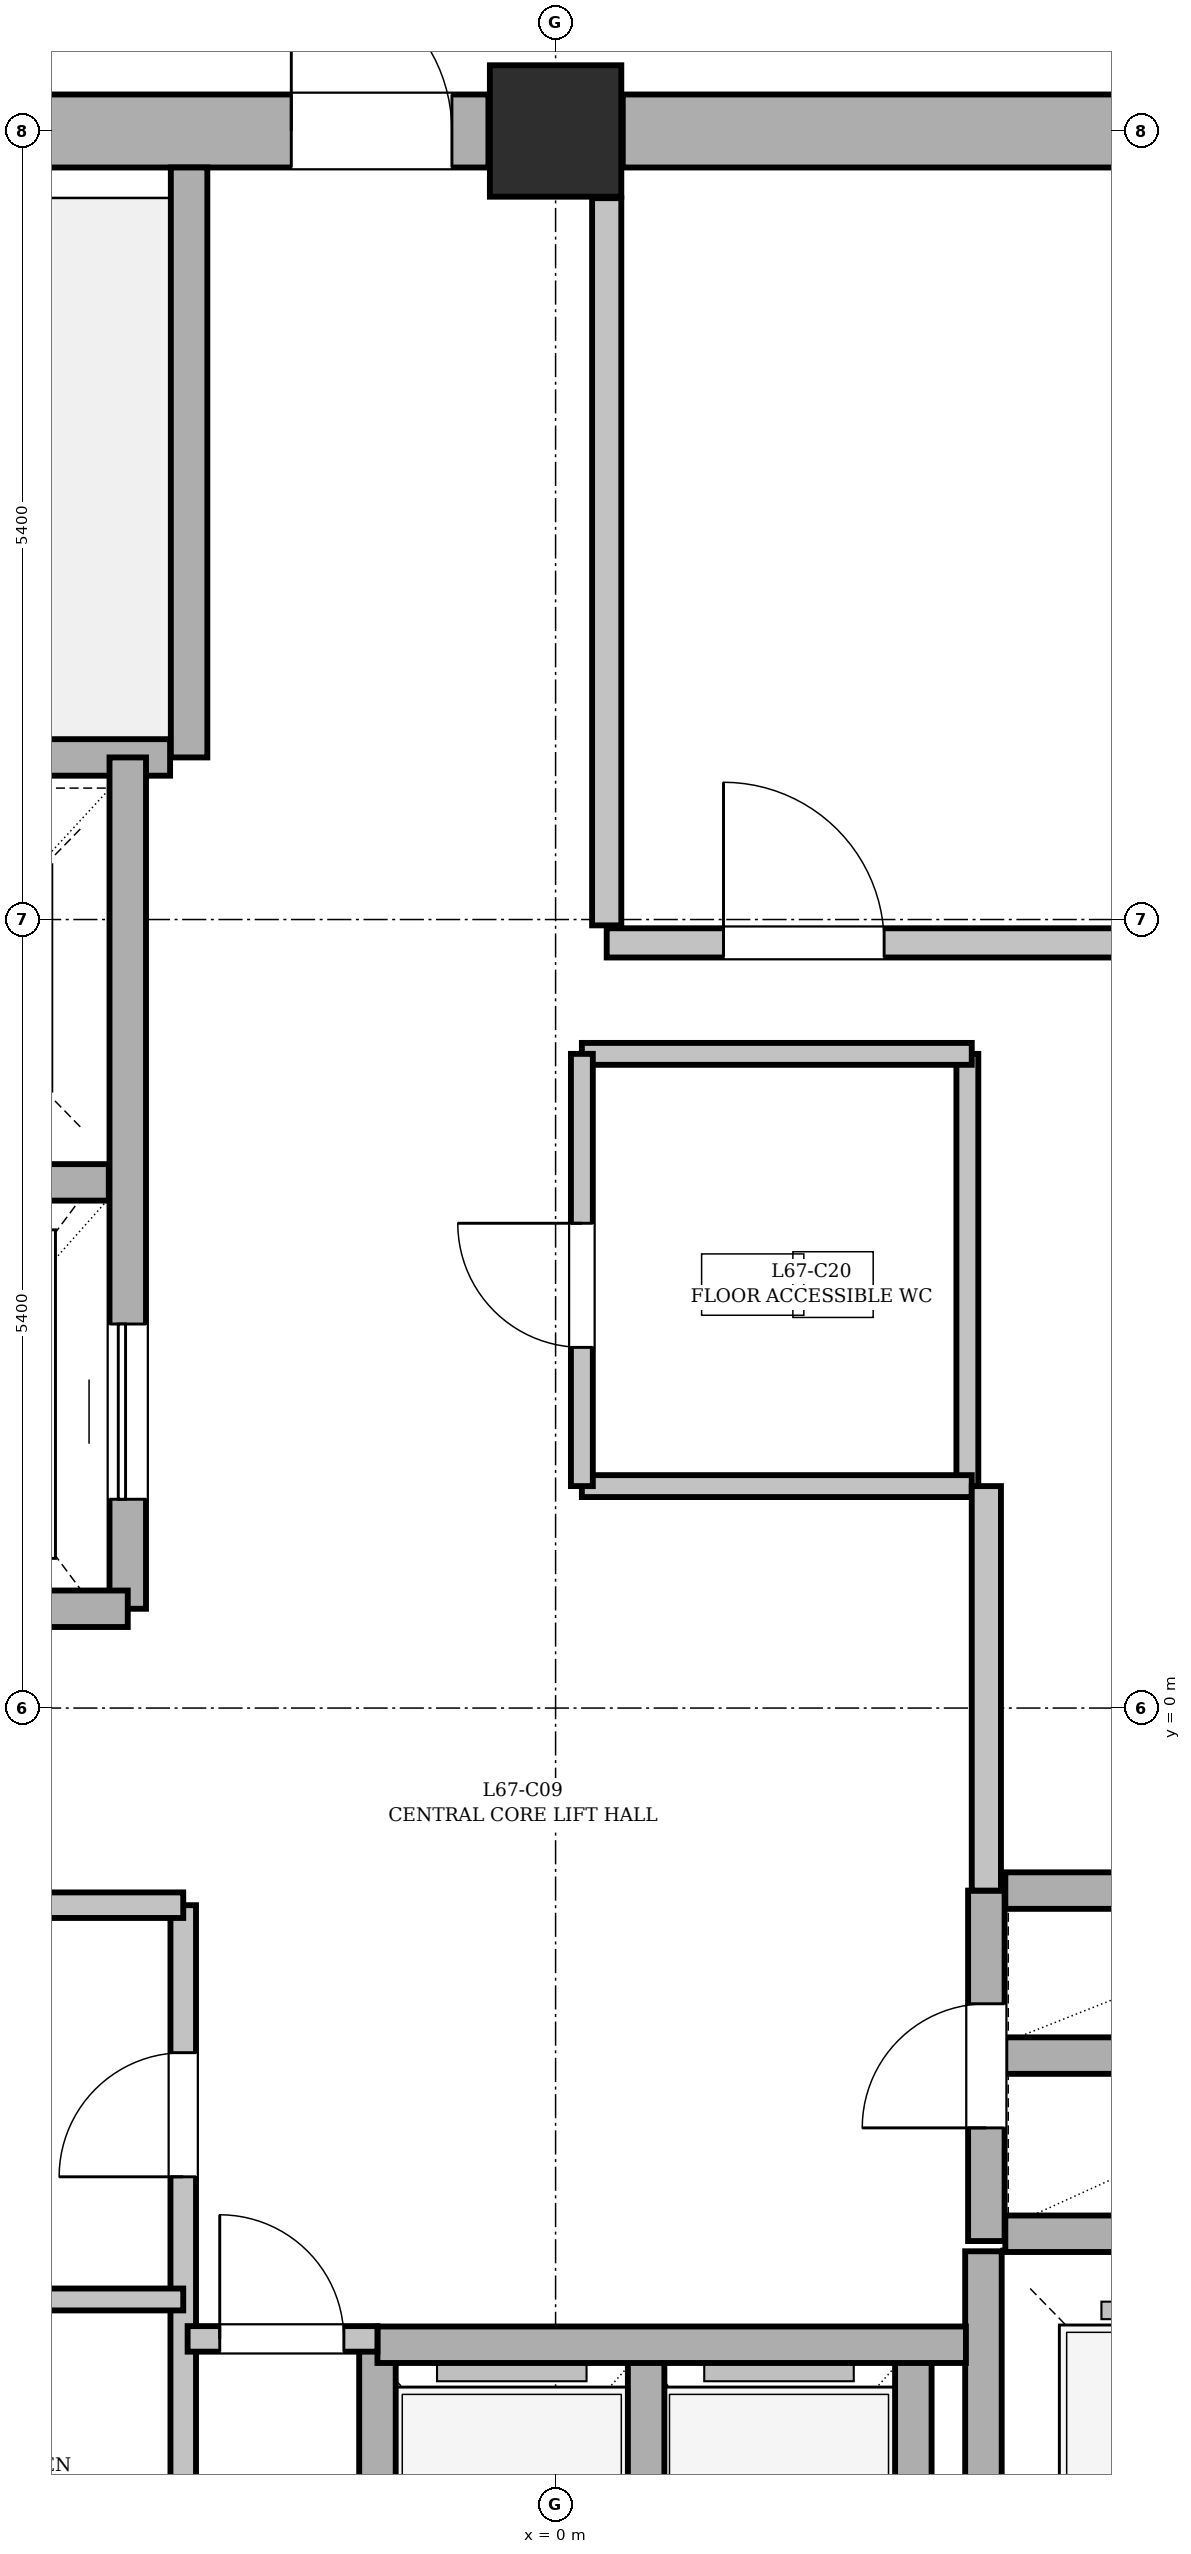
"""IFC4 building model, lengths in metres.
Left out: names, types, materials, properties, quantities, classifications, styles, units other than length and angle.
Written with IfcOpenShell. Run it as: python <this file> out.ifc"""

import sys

from ifc_helpers import new_model, si_unit, direction, frame, frame_2d, origin, origin_2d, place, context, subcontext, project, spatial, rectangle, extrude, element, fill, save


model = new_model("IFC4")
c1 = context("Model", 3, precision=1e-05, world=origin(), true_north=direction((0.0, 1.0)))
c2 = subcontext(c1, "Body", "Model", "MODEL_VIEW")
j1 = project(units=[si_unit("LENGTHUNIT", "METRE"), si_unit("PLANEANGLEUNIT", "RADIAN")], contexts=[c1])
p1 = place(None, origin())
s1 = spatial("IfcSite", under=j1, at=p1, CompositionType="ELEMENT")
p2 = place(p1, origin())
s2 = spatial("IfcBuilding", under=s1, at=p2, CompositionType="ELEMENT")
p3 = place(p2, frame((0.0, 0.0, 258.75)))
s3 = spatial("IfcBuildingStorey", under=s2, at=p3, CompositionType="ELEMENT", Elevation=258.75)
p4 = place(p3, frame((0.0, 10.8, 0.0), z_axis=(0.0, 0.0, 1.0), x_axis=(1.0, 0.0, 0.0)))
e1 = element("IfcColumn", 1, at=p4, inside=s3, PredefinedType="COLUMN", context=c2, shape_type="SweptSolid", body=[
    extrude(rectangle(XDim=0.9, YDim=0.9, at=origin_2d()), origin(), (0.0, 0.0, 1.0), 3.75),
])
p5 = place(p3, frame((-4.94, 10.8, 0.0), z_axis=(0.0, 0.0, 1.0), x_axis=(1.0, 0.0, 0.0)))
e2 = element("IfcWall", 2, at=p5, inside=s3, PredefinedType="SHEAR", context=c2, shape_type="SweptSolid", body=[
    extrude(rectangle(XDim=4.48, YDim=0.5, at=frame_2d((2.24, 0.0))), origin(), (0.0, 0.0, 1.0), 3.75),
])
p6 = place(p5, frame((3.13, 0.0, 0.0)))
e3 = element("IfcOpeningElement", 3, at=p6, cuts=e2, PredefinedType="OPENING", context=c2, shape_type="SweptSolid", body=[
    extrude(rectangle(XDim=1.1, YDim=2.1, at=frame_2d((0.55, 1.05))), frame((0.0, 0.26, 0.0), z_axis=(0.0, -1.0, 0.0), x_axis=(1.0, 0.0, 0.0)), (0.0, 0.0, 1.0), 0.52),
])
p7 = place(p3, frame((0.46, 10.8, 0.0), z_axis=(0.0, 0.0, 1.0), x_axis=(1.0, 0.0, 0.0)))
e4 = element("IfcWall", 4, at=p7, inside=s3, PredefinedType="SHEAR", context=c2, shape_type="SweptSolid", body=[
    extrude(rectangle(XDim=4.48, YDim=0.5, at=frame_2d((2.24, 0.0))), origin(), (0.0, 0.0, 1.0), 3.75),
])
p8 = place(p3, frame((2.93, -6.51, 0.0), z_axis=(0.0, 0.0, 1.0), x_axis=(0.0, 1.0, 0.0)))
e5 = element("IfcWall", 5, at=p8, inside=s3, PredefinedType="SHEAR", context=c2, shape_type="SweptSolid", body=[
    extrude(rectangle(XDim=2.79, YDim=0.25, at=frame_2d((1.395, 0.0))), origin(), (0.0, 0.0, 1.0), 3.75),
])
p9 = place(p3, frame((3.08, -3.6, 0.0), z_axis=(0.0, 0.0, 1.0), x_axis=(1.0, 0.0, 0.0)))
e6 = element("IfcWall", 6, at=p9, inside=s3, PredefinedType="SHEAR", context=c2, shape_type="SweptSolid", body=[
    extrude(rectangle(XDim=2.37, YDim=0.25, at=frame_2d((1.185, 0.0))), origin(), (0.0, 0.0, 1.0), 3.75),
])
for number, where, z_axis, x_axis in (
    (7, (0.62, -6.34, 0.0), (0.0, 0.0, 1.0), (0.0, 1.0, 0.0)),
    (8, (2.45, -6.34, 0.0), (0.0, 0.0, 1.0), (0.0, 1.0, 0.0)),
):
    element("IfcWall", number, at=place(p3, frame(where, z_axis=z_axis, x_axis=x_axis)), inside=s3, PredefinedType="SHEAR", context=c2, shape_type="SweptSolid", body=[
        extrude(rectangle(XDim=1.88, YDim=0.25, at=frame_2d((0.94, 0.0))), origin(), (0.0, 0.0, 1.0), 3.75),
    ])
p10 = place(p3, frame((-1.22, -6.44, 0.0), z_axis=(0.0, 0.0, 1.0), x_axis=(0.0, 1.0, 0.0)))
e9 = element("IfcWall", 9, at=p10, inside=s3, PredefinedType="SHEAR", context=c2, shape_type="SweptSolid", body=[
    extrude(rectangle(XDim=2.08, YDim=0.25, at=frame_2d((1.04, 0.0))), origin(), (0.0, 0.0, 1.0), 3.75),
])
p11 = place(p3, frame((-1.22, -4.36, 0.0), z_axis=(0.0, 0.0, 1.0), x_axis=(1.0, 0.0, 0.0)))
e10 = element("IfcWall", 10, at=p11, inside=s3, PredefinedType="SHEAR", context=c2, shape_type="SweptSolid", body=[
    extrude(rectangle(XDim=4.03, YDim=0.25, at=frame_2d((2.015, 0.0))), origin(), (0.0, 0.0, 1.0), 3.75),
])
for number, where, z_axis, x_axis in (
    (11, (3.08, -2.38, 0.0), (0.0, 0.0, 1.0), (1.0, 0.0, 0.0)),
    (12, (3.08, -1.25, 0.0), (0.0, 0.0, 1.0), (1.0, 0.0, 0.0)),
):
    element("IfcWall", number, at=place(p3, frame(where, z_axis=z_axis, x_axis=x_axis)), inside=s3, PredefinedType="SHEAR", context=c2, shape_type="SweptSolid", body=[
        extrude(rectangle(XDim=2.37, YDim=0.25, at=frame_2d((1.185, 0.0))), origin(), (0.0, 0.0, 1.0), 3.75),
    ])
p12 = place(p3, frame((2.95, -3.65, 0.0), z_axis=(0.0, 0.0, 1.0), x_axis=(0.0, 1.0, 0.0)))
e13 = element("IfcWall", 13, at=p12, inside=s3, PredefinedType="SHEAR", context=c2, shape_type="SweptSolid", body=[
    extrude(rectangle(XDim=2.4, YDim=0.25, at=frame_2d((1.2, 0.0))), origin(), (0.0, 0.0, 1.0), 3.75),
])
p13 = place(p12, frame((0.775, 0.0, 0.0)))
e14 = element("IfcOpeningElement", 14, at=p13, cuts=e13, PredefinedType="OPENING", context=c2, shape_type="SweptSolid", body=[
    extrude(rectangle(XDim=0.85, YDim=2.1, at=frame_2d((0.425, 1.05))), frame((0.0, 0.135, 0.0), z_axis=(0.0, -1.0, 0.0), x_axis=(1.0, 0.0, 0.0)), (0.0, 0.0, 1.0), 0.27),
])
p14 = place(p3, frame((-2.51, 6.51, 0.0), z_axis=(0.0, 0.0, 1.0), x_axis=(0.0, 1.0, 0.0)))
e15 = element("IfcWall", 15, at=p14, inside=s3, PredefinedType="SHEAR", context=c2, shape_type="SweptSolid", body=[
    extrude(rectangle(XDim=4.04, YDim=0.25, at=frame_2d((2.02, 0.0))), origin(), (0.0, 0.0, 1.0), 3.75),
])
p15 = place(p3, frame((-10.34, 6.51, 0.0), z_axis=(0.0, 0.0, 1.0), x_axis=(1.0, 0.0, 0.0)))
e16 = element("IfcWall", 16, at=p15, inside=s3, PredefinedType="SHEAR", context=c2, shape_type="SweptSolid", body=[
    extrude(rectangle(XDim=7.7, YDim=0.25, at=frame_2d((3.85, 0.0))), origin(), (0.0, 0.0, 1.0), 3.75),
])
p16 = place(p15, frame((0.35, 0.0, 0.0)))
e17 = element("IfcOpeningElement", 17, at=p16, cuts=e16, PredefinedType="OPENING", context=c2, shape_type="SweptSolid", body=[
    extrude(rectangle(XDim=1.1, YDim=2.1, at=frame_2d((0.55, 1.05))), frame((0.0, 0.135, 0.0), z_axis=(0.0, -1.0, 0.0), x_axis=(1.0, 0.0, 0.0)), (0.0, 0.0, 1.0), 0.27),
])
p17 = place(p3, frame((-2.93, 0.68, 0.0), z_axis=(0.0, 0.0, 1.0), x_axis=(0.0, 1.0, 0.0)))
e18 = element("IfcWall", 18, at=p17, inside=s3, PredefinedType="SHEAR", context=c2, shape_type="SweptSolid", body=[
    extrude(rectangle(XDim=5.83, YDim=0.25, at=frame_2d((2.915, 0.0))), origin(), (0.0, 0.0, 1.0), 3.75),
])
p18 = place(p17, frame((0.75, 0.0, 0.0)))
e19 = element("IfcOpeningElement", 19, at=p18, cuts=e18, PredefinedType="OPENING", context=c2, shape_type="SweptSolid", body=[
    extrude(rectangle(XDim=1.2, YDim=2.1, at=frame_2d((0.6, 1.05))), frame((0.0, 0.135, 0.0), z_axis=(0.0, -1.0, 0.0), x_axis=(1.0, 0.0, 0.0)), (0.0, 0.0, 1.0), 0.27),
])
p19 = place(p3, frame((-5.45, 3.6, 0.0), z_axis=(0.0, 0.0, 1.0), x_axis=(1.0, 0.0, 0.0)))
e20 = element("IfcWall", 20, at=p19, inside=s3, PredefinedType="SHEAR", context=c2, shape_type="SweptSolid", body=[
    extrude(rectangle(XDim=2.39, YDim=0.25, at=frame_2d((1.195, 0.0))), origin(), (0.0, 0.0, 1.0), 3.75),
])
p20 = place(p3, frame((-5.58, 0.68, 0.0), z_axis=(0.0, 0.0, 1.0), x_axis=(1.0, 0.0, 0.0)))
e21 = element("IfcWall", 21, at=p20, inside=s3, PredefinedType="SHEAR", context=c2, shape_type="SweptSolid", body=[
    extrude(rectangle(XDim=2.65, YDim=0.25, at=frame_2d((1.325, 0.0))), origin(), (0.0, 0.0, 1.0), 3.75),
])
p21 = place(p3, frame((2.82, 1.52, 0.0), z_axis=(0.0, 0.0, 1.0), x_axis=(0.0, 1.0, 0.0)))
e22 = element("IfcWall", 22, at=p21, inside=s3, PredefinedType="PARTITIONING", context=c2, shape_type="SweptSolid", body=[
    extrude(rectangle(XDim=2.96, YDim=0.15, at=frame_2d((1.48, 0.0))), origin(), (0.0, 0.0, 1.0), 3.57),
])
for number, where, z_axis, x_axis in (
    (23, (0.18, 4.48, 0.0), (0.0, 0.0, 1.0), (1.0, 0.0, 0.0)),
    (24, (0.18, 1.52, 0.0), (0.0, 0.0, 1.0), (1.0, 0.0, 0.0)),
):
    element("IfcWall", number, at=place(p3, frame(where, z_axis=z_axis, x_axis=x_axis)), inside=s3, PredefinedType="PARTITIONING", context=c2, shape_type="SweptSolid", body=[
        extrude(rectangle(XDim=2.67, YDim=0.15, at=frame_2d((1.335, 0.0))), origin(), (0.0, 0.0, 1.0), 3.57),
    ])
p22 = place(p3, frame((0.18, 1.52, 0.0), z_axis=(0.0, 0.0, 1.0), x_axis=(0.0, 1.0, 0.0)))
e25 = element("IfcWall", 25, at=p22, inside=s3, PredefinedType="PARTITIONING", context=c2, shape_type="SweptSolid", body=[
    extrude(rectangle(XDim=2.96, YDim=0.15, at=frame_2d((1.48, 0.0))), origin(), (0.0, 0.0, 1.0), 3.57),
])
p23 = place(p22, frame((0.95, 0.0, 0.0)))
e26 = element("IfcOpeningElement", 26, at=p23, cuts=e25, PredefinedType="OPENING", context=c2, shape_type="SweptSolid", body=[
    extrude(rectangle(XDim=0.85, YDim=2.1, at=frame_2d((0.425, 1.05))), frame((0.0, 0.085, 0.0), z_axis=(0.0, -1.0, 0.0), x_axis=(1.0, 0.0, 0.0)), (0.0, 0.0, 1.0), 0.17),
])
p24 = place(p3, frame((0.35, 5.24, 0.0), z_axis=(0.0, 0.0, 1.0), x_axis=(1.0, 0.0, 0.0)))
e27 = element("IfcWall", 27, at=p24, inside=s3, PredefinedType="PARTITIONING", context=c2, shape_type="SweptSolid", body=[
    extrude(rectangle(XDim=9.99, YDim=0.2, at=frame_2d((4.995, 0.0))), origin(), (0.0, 0.0, 1.0), 3.57),
])
p25 = place(p24, frame((0.8, 0.0, 0.0)))
e28 = element("IfcOpeningElement", 28, at=p25, cuts=e27, PredefinedType="OPENING", context=c2, shape_type="SweptSolid", body=[
    extrude(rectangle(XDim=1.1, YDim=2.1, at=frame_2d((0.55, 1.05))), frame((0.0, 0.11, 0.0), z_axis=(0.0, -1.0, 0.0), x_axis=(1.0, 0.0, 0.0)), (0.0, 0.0, 1.0), 0.22),
])
p26 = place(p3, frame((0.35, 5.36, 0.0), z_axis=(0.0, 0.0, 1.0), x_axis=(0.0, 1.0, 0.0)))
e29 = element("IfcWall", 29, at=p26, inside=s3, PredefinedType="PARTITIONING", context=c2, shape_type="SweptSolid", body=[
    extrude(rectangle(XDim=4.98, YDim=0.2, at=frame_2d((2.49, 0.0))), origin(), (0.0, 0.0, 1.0), 3.57),
])
p27 = place(p3, frame((-2.55, -6.51, 0.0), z_axis=(0.0, 0.0, 1.0), x_axis=(0.0, 1.0, 0.0)))
e30 = element("IfcWall", 30, at=p27, inside=s3, PredefinedType="PARTITIONING", context=c2, shape_type="SweptSolid", body=[
    extrude(rectangle(XDim=5.16, YDim=0.175, at=frame_2d((2.58, 0.0))), origin(), (0.0, 0.0, 1.0), 3.57),
])
p28 = place(p27, frame((3.3, 0.0, 0.0)))
e31 = element("IfcOpeningElement", 31, at=p28, cuts=e30, PredefinedType="OPENING", context=c2, shape_type="SweptSolid", body=[
    extrude(rectangle(XDim=0.85, YDim=2.1, at=frame_2d((0.425, 1.05))), frame((0.0, 0.097, 0.0), z_axis=(0.0, -1.0, 0.0), x_axis=(1.0, 0.0, 0.0)), (0.0, 0.0, 1.0), 0.195),
])
p29 = place(p3, frame((-7.18, -4.05, 0.0), z_axis=(0.0, 0.0, 1.0), x_axis=(1.0, 0.0, 0.0)))
e32 = element("IfcWall", 32, at=p29, inside=s3, PredefinedType="PARTITIONING", context=c2, shape_type="SweptSolid", body=[
    extrude(rectangle(XDim=4.63, YDim=0.15, at=frame_2d((2.315, 0.0))), origin(), (0.0, 0.0, 1.0), 3.57),
])
p30 = place(p29, frame((1.0, 0.0, 0.0)))
e33 = element("IfcOpeningElement", 33, at=p30, cuts=e32, PredefinedType="OPENING", context=c2, shape_type="SweptSolid", body=[
    extrude(rectangle(XDim=0.85, YDim=2.1, at=frame_2d((0.425, 1.05))), frame((0.0, 0.085, 0.0), z_axis=(0.0, -1.0, 0.0), x_axis=(1.0, 0.0, 0.0)), (0.0, 0.0, 1.0), 0.17),
])
p31 = place(p3, frame((-7.18, -1.35, 0.0), z_axis=(0.0, 0.0, 1.0), x_axis=(1.0, 0.0, 0.0)))
e34 = element("IfcWall", 34, at=p31, inside=s3, PredefinedType="PARTITIONING", context=c2, shape_type="SweptSolid", body=[
    extrude(rectangle(XDim=4.63, YDim=0.175, at=frame_2d((2.315, 0.0))), origin(), (0.0, 0.0, 1.0), 3.57),
])
p32 = place(p3, frame((-2.52, -4.32, 0.0), z_axis=(0.0, 0.0, 1.0), x_axis=(1.0, 0.0, 0.0)))
e35 = element("IfcWall", 35, at=p32, inside=s3, PredefinedType="PARTITIONING", context=c2, shape_type="SweptSolid", body=[
    extrude(rectangle(XDim=1.3, YDim=0.175, at=frame_2d((0.65, 0.0))), origin(), (0.0, 0.0, 1.0), 3.57),
])
p33 = place(p32, frame((0.22, 0.0, 0.0)))
e36 = element("IfcOpeningElement", 36, at=p33, cuts=e35, PredefinedType="OPENING", context=c2, shape_type="SweptSolid", body=[
    extrude(rectangle(XDim=0.85, YDim=2.1, at=frame_2d((0.425, 1.05))), frame((0.0, 0.097, 0.0), z_axis=(0.0, -1.0, 0.0), x_axis=(1.0, 0.0, 0.0)), (0.0, 0.0, 1.0), 0.195),
])
p34 = place(p3, frame((2.95, -1.25, 0.0), z_axis=(0.0, 0.0, 1.0), x_axis=(0.0, 1.0, 0.0)))
e37 = element("IfcWall", 37, at=p34, inside=s3, PredefinedType="PARTITIONING", context=c2, shape_type="SweptSolid", body=[
    extrude(rectangle(XDim=2.77, YDim=0.2, at=frame_2d((1.385, 0.0))), origin(), (0.0, 0.0, 1.0), 3.57),
])
p35 = place(p23, origin())
e38 = element("IfcDoor", 38, at=p35, inside=s3, OperationType="SINGLE_SWING_RIGHT", PredefinedType="DOOR", context=c2, shape_type="SweptSolid", body=[
    extrude(rectangle(XDim=0.85, YDim=2.1, at=frame_2d((0.425, 1.05))), frame((0.0, 0.025, 0.0), z_axis=(0.0, -1.0, 0.0), x_axis=(1.0, 0.0, 0.0)), (0.0, 0.0, 1.0), 0.05),
])
fill(e26, e38)
p36 = place(p13, origin())
e39 = element("IfcDoor", 39, at=p36, inside=s3, OperationType="SINGLE_SWING_LEFT", PredefinedType="DOOR", context=c2, shape_type="SweptSolid", body=[
    extrude(rectangle(XDim=0.85, YDim=2.1, at=frame_2d((0.425, 1.05))), frame((0.0, 0.025, 0.0), z_axis=(0.0, -1.0, 0.0), x_axis=(1.0, 0.0, 0.0)), (0.0, 0.0, 1.0), 0.05),
])
fill(e14, e39)
p37 = place(p6, origin())
e40 = element("IfcDoor", 40, at=p37, inside=s3, OperationType="SINGLE_SWING_LEFT", PredefinedType="DOOR", context=c2, shape_type="SweptSolid", body=[
    extrude(rectangle(XDim=1.1, YDim=2.1, at=frame_2d((0.55, 1.05))), frame((0.0, 0.025, 0.0), z_axis=(0.0, -1.0, 0.0), x_axis=(1.0, 0.0, 0.0)), (0.0, 0.0, 1.0), 0.05),
])
fill(e3, e40)
p38 = place(p18, origin())
e41 = element("IfcDoor", 41, at=p38, inside=s3, OperationType="SLIDING_TO_LEFT", PredefinedType="DOOR", context=c2, shape_type="SweptSolid", body=[
    extrude(rectangle(XDim=1.2, YDim=2.1, at=frame_2d((0.6, 1.05))), frame((0.0, 0.025, 0.0), z_axis=(0.0, -1.0, 0.0), x_axis=(1.0, 0.0, 0.0)), (0.0, 0.0, 1.0), 0.05),
])
fill(e19, e41)
p39 = place(p25, origin())
e42 = element("IfcDoor", 42, at=p39, inside=s3, OperationType="SINGLE_SWING_LEFT", PredefinedType="DOOR", context=c2, shape_type="SweptSolid", body=[
    extrude(rectangle(XDim=1.1, YDim=2.1, at=frame_2d((0.55, 1.05))), frame((0.0, 0.025, 0.0), z_axis=(0.0, -1.0, 0.0), x_axis=(1.0, 0.0, 0.0)), (0.0, 0.0, 1.0), 0.05),
])
fill(e28, e42)
p40 = place(p33, origin())
e43 = element("IfcDoor", 43, at=p40, inside=s3, OperationType="SINGLE_SWING_LEFT", PredefinedType="DOOR", context=c2, shape_type="SweptSolid", body=[
    extrude(rectangle(XDim=0.85, YDim=2.1, at=frame_2d((0.425, 1.05))), frame((0.0, 0.025, 0.0), z_axis=(0.0, -1.0, 0.0), x_axis=(1.0, 0.0, 0.0)), (0.0, 0.0, 1.0), 0.05),
])
fill(e36, e43)
p41 = place(p28, origin())
e44 = element("IfcDoor", 44, at=p41, inside=s3, OperationType="SINGLE_SWING_LEFT", PredefinedType="DOOR", context=c2, shape_type="SweptSolid", body=[
    extrude(rectangle(XDim=0.85, YDim=2.1, at=frame_2d((0.425, 1.05))), frame((0.0, 0.025, 0.0), z_axis=(0.0, -1.0, 0.0), x_axis=(1.0, 0.0, 0.0)), (0.0, 0.0, 1.0), 0.05),
])
fill(e31, e44)
save(model, sys.argv[1])
